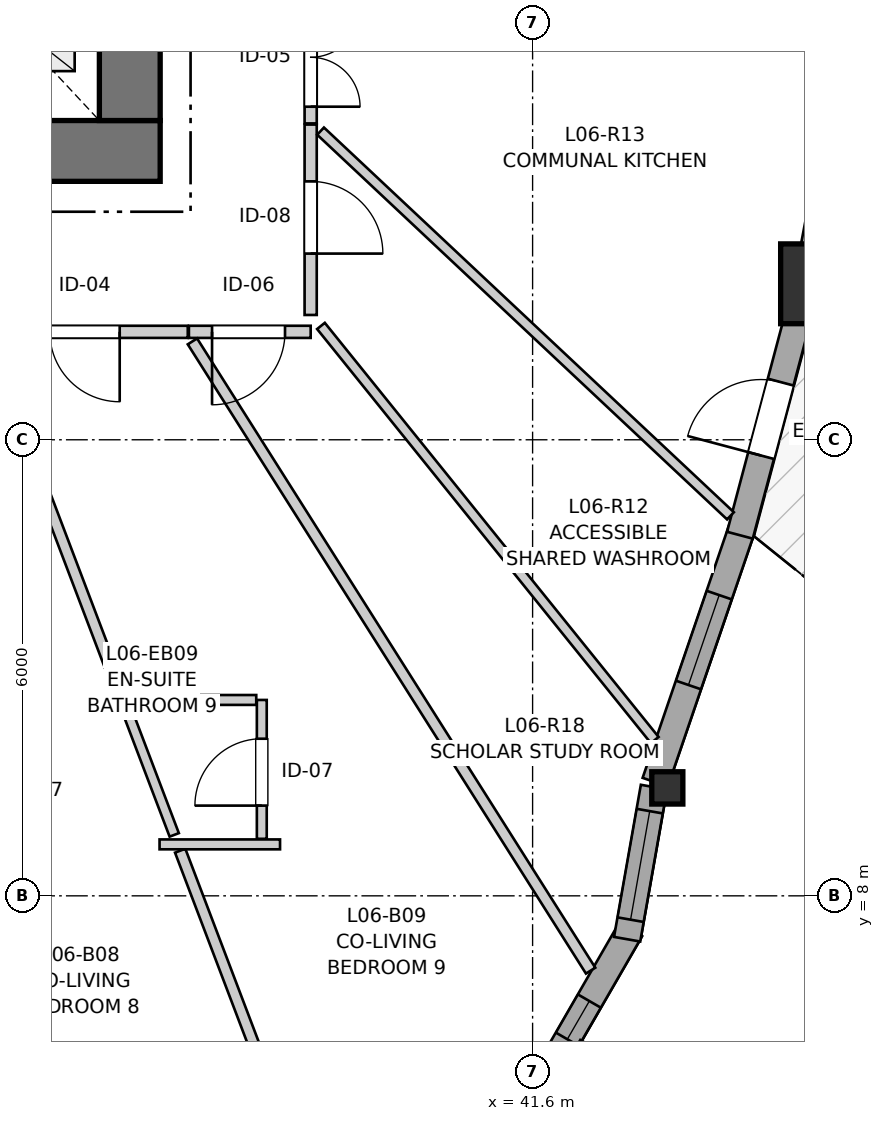
"""IFC4 building model, lengths in metres.
Left out: names, types, materials, properties, quantities, classifications, styles, units other than length and angle.
Written with IfcOpenShell. Run it as: python <this file> out.ifc"""

import sys

from ifc_helpers import new_model, si_unit, direction, frame, frame_2d, origin, origin_2d, place, context, subcontext, project, spatial, rectangle, i_section, extrude, source, transform, mapped, element, fill, save


model = new_model("IFC4")
c1 = context("Model", 3, precision=1e-05, world=origin(), true_north=direction((0.0, 1.0)))
c2 = subcontext(c1, "Body", "Model", "MODEL_VIEW")
j1 = project(units=[si_unit("LENGTHUNIT", "METRE"), si_unit("PLANEANGLEUNIT", "RADIAN")], contexts=[c1])
p1 = place(None, origin())
s1 = spatial("IfcSite", under=j1, at=p1, CompositionType="ELEMENT")
p2 = place(p1, origin())
s2 = spatial("IfcBuilding", under=s1, at=p2, CompositionType="ELEMENT")
p3 = place(p2, frame((0.0, 0.0, 23.8)))
s3 = spatial("IfcBuildingStorey", under=s2, at=p3, CompositionType="ELEMENT", Elevation=23.8)
p4 = place(p3, frame((24.0, 17.8, 0.0), z_axis=(0.0, 0.0, 1.0), x_axis=(1.0, 0.0, 0.0)))
e1 = element("IfcWall", 1, at=p4, inside=s3, PredefinedType="SHEAR", context=c2, shape_type="SweptSolid", body=[
    extrude(rectangle(XDim=12.7, YDim=0.8, at=frame_2d((6.35, 0.0))), origin(), (0.0, 0.0, 1.0), 2.935),
])
p5 = place(p3, frame((36.3, 18.2, 0.0), z_axis=(0.0, 0.0, 1.0), x_axis=(0.0, 1.0, 0.0)))
e2 = element("IfcWall", 2, at=p5, inside=s3, PredefinedType="SHEAR", context=c2, shape_type="SweptSolid", body=[
    extrude(rectangle(XDim=15.6, YDim=0.8, at=frame_2d((7.8, 0.0))), origin(), (0.0, 0.0, 1.0), 2.935),
])
p6 = place(p5, frame((4.25, 0.0, 0.0)))
e3 = element("IfcOpeningElement", 3, at=p6, cuts=e2, PredefinedType="OPENING", context=c2, shape_type="SweptSolid", body=[
    extrude(rectangle(XDim=1.1, YDim=2.15, at=frame_2d((0.55, 1.075))), frame((0.0, 0.41, 0.0), z_axis=(0.0, -1.0, 0.0), x_axis=(1.0, 0.0, 0.0)), (0.0, 0.0, 1.0), 0.82),
])
p7 = place(p5, frame((10.25, 0.0, 0.0)))
e4 = element("IfcOpeningElement", 4, at=p7, cuts=e2, PredefinedType="OPENING", context=c2, shape_type="SweptSolid", body=[
    extrude(rectangle(XDim=1.1, YDim=2.15, at=frame_2d((0.55, 1.075))), frame((0.0, 0.41, 0.0), z_axis=(0.0, -1.0, 0.0), x_axis=(1.0, 0.0, 0.0)), (0.0, 0.0, 1.0), 0.82),
])
m1 = source(origin(), c2, "Body", "SweptSolid", [
    extrude(i_section(OverallWidth=0.409, OverallDepth=0.425, WebThickness=0.03, FlangeThickness=0.048, FilletRadius=0.015, at=origin_2d()), origin(), (0.0, 0.0, 1.0), 2.935),
])
p8 = place(p3, frame((43.373, 9.42, 0.0), z_axis=(0.0, 0.0, 1.0), x_axis=(1.0, 0.0, 0.0)))
e5 = element("IfcColumn", 5, at=p8, inside=s3, PredefinedType="PILASTER", context=c2, shape_type="MappedRepresentation", body=[
    mapped(m1, transform((0.0, 0.0, 0.0), x_axis=(1.0, 0.0, 0.0), y_axis=(0.0, 1.0, 0.0), z_axis=(0.0, 0.0, 1.0), scale=1.0)),
])
m2 = source(origin(), c2, "Body", "SweptSolid", [
    extrude(rectangle(XDim=1.05, YDim=1.05, at=origin_2d()), origin(), (0.0, 0.0, 1.0), 2.935),
])
p9 = place(p3, frame((45.389, 16.052, 0.0), z_axis=(0.0, 0.0, 1.0), x_axis=(1.0, 0.0, 0.0)))
e6 = element("IfcColumn", 6, at=p9, inside=s3, PredefinedType="COLUMN", context=c2, shape_type="MappedRepresentation", body=[
    mapped(m2, transform((0.0, 0.0, 0.0), x_axis=(1.0, 0.0, 0.0), y_axis=(0.0, 1.0, 0.0), z_axis=(0.0, 0.0, 1.0), scale=1.0)),
])
p10 = place(p3, frame((41.845, 5.746, 0.0), z_axis=(0.0, 0.0, 1.0), x_axis=(0.499995423472, 0.866028046028, 0.0)))
e7 = element("IfcWall", 7, at=p10, inside=s3, PredefinedType="SOLIDWALL", context=c2, shape_type="SweptSolid", body=[
    extrude(rectangle(XDim=2.09, YDim=0.35, at=frame_2d((1.045, 0.0))), origin(), (0.0, 0.0, 1.0), 2.415),
])
p11 = place(p10, frame((0.424, 0.0, 0.82)))
e8 = element("IfcOpeningElement", 8, at=p11, cuts=e7, PredefinedType="OPENING", context=c2, shape_type="SweptSolid", body=[
    extrude(rectangle(XDim=0.58, YDim=1.35, at=frame_2d((0.29, 0.675))), frame((0.0, 0.185, 0.0), z_axis=(0.0, -1.0, 0.0), x_axis=(1.0, 0.0, 0.0)), (0.0, 0.0, 1.0), 0.37),
])
p12 = place(p3, frame((42.844, 7.429, 0.0), z_axis=(0.0, 0.0, 1.0), x_axis=(0.17370309897, 0.984798067326, 0.0)))
e9 = element("IfcWall", 9, at=p12, inside=s3, PredefinedType="SOLIDWALL", context=c2, shape_type="SweptSolid", body=[
    extrude(rectangle(XDim=2.032, YDim=0.35, at=frame_2d((1.016, 0.0))), origin(), (0.0, 0.0, 1.0), 2.415),
])
p13 = place(p12, frame((0.261, 0.0, 0.82)))
e10 = element("IfcOpeningElement", 10, at=p13, cuts=e9, PredefinedType="OPENING", context=c2, shape_type="SweptSolid", body=[
    extrude(rectangle(XDim=1.45, YDim=1.25, at=frame_2d((0.725, 0.625))), frame((0.0, 0.185, 0.0), z_axis=(0.0, -1.0, 0.0), x_axis=(1.0, 0.0, 0.0)), (0.0, 0.0, 1.0), 0.37),
])
p14 = place(p3, frame((43.213, 9.496, 0.0), z_axis=(0.0, 0.0, 1.0), x_axis=(0.323599506414, 0.946194144692, 0.0)))
e11 = element("IfcWall", 11, at=p14, inside=s3, PredefinedType="SOLIDWALL", context=c2, shape_type="SweptSolid", body=[
    extrude(rectangle(XDim=3.522, YDim=0.35, at=frame_2d((1.761, 0.0))), origin(), (0.0, 0.0, 1.0), 2.415),
])
p15 = place(p14, frame((1.351, 0.0, 0.82)))
e12 = element("IfcOpeningElement", 12, at=p15, cuts=e11, PredefinedType="OPENING", context=c2, shape_type="SweptSolid", body=[
    extrude(rectangle(XDim=1.25, YDim=1.35, at=frame_2d((0.625, 0.675))), frame((0.0, 0.185, 0.0), z_axis=(0.0, -1.0, 0.0), x_axis=(1.0, 0.0, 0.0)), (0.0, 0.0, 1.0), 0.37),
])
p16 = place(p3, frame((44.328, 12.744, 0.0), z_axis=(0.0, 0.0, 1.0), x_axis=(0.257063268192, 0.966394575806, 0.0)))
e13 = element("IfcWall", 13, at=p16, inside=s3, PredefinedType="SOLIDWALL", context=c2, shape_type="SweptSolid", body=[
    extrude(rectangle(XDim=3.169, YDim=0.35, at=frame_2d((1.584, 0.0))), origin(), (0.0, 0.0, 1.0), 2.415),
])
p17 = place(p16, frame((1.085, 0.0, 0.0)))
e14 = element("IfcOpeningElement", 14, at=p17, cuts=e13, PredefinedType="OPENING", context=c2, shape_type="SweptSolid", body=[
    extrude(rectangle(XDim=1.0, YDim=2.1, at=frame_2d((0.5, 1.05))), frame((0.0, 0.185, 0.0), z_axis=(0.0, -1.0, 0.0), x_axis=(1.0, 0.0, 0.0)), (0.0, 0.0, 1.0), 0.37),
])
p18 = place(p3, frame((45.273, 16.379, 0.0), z_axis=(0.0, 0.0, 1.0), x_axis=(0.186712111557, 0.982414671815, 0.0)))
e15 = element("IfcWall", 15, at=p18, inside=s3, PredefinedType="SOLIDWALL", context=c2, shape_type="SweptSolid", body=[
    extrude(rectangle(XDim=3.113, YDim=0.35, at=frame_2d((1.557, 0.0))), origin(), (0.0, 0.0, 1.0), 2.415),
])
p19 = place(p18, frame((0.939, 0.0, 0.82)))
e16 = element("IfcOpeningElement", 16, at=p19, cuts=e15, PredefinedType="OPENING", context=c2, shape_type="SweptSolid", body=[
    extrude(rectangle(XDim=0.95, YDim=1.35, at=frame_2d((0.475, 0.675))), frame((0.0, 0.185, 0.0), z_axis=(0.0, -1.0, 0.0), x_axis=(1.0, 0.0, 0.0)), (0.0, 0.0, 1.0), 0.37),
])
p20 = place(p3, frame((38.68, 22.264, 0.0), z_axis=(0.0, 0.0, 1.0), x_axis=(0.0, -1.0, 0.0)))
e17 = element("IfcWall", 17, at=p20, inside=s3, PredefinedType="PARTITIONING", context=c2, shape_type="SweptSolid", body=[
    extrude(rectangle(XDim=4.102, YDim=0.16, at=frame_2d((2.051, 0.0))), origin(), (0.0, 0.0, 1.0), 2.935),
])
p21 = place(p20, frame((2.582, 0.0, 0.0)))
e18 = element("IfcOpeningElement", 18, at=p21, cuts=e17, PredefinedType="OPENING", context=c2, shape_type="SweptSolid", body=[
    extrude(rectangle(XDim=1.3, YDim=2.1, at=frame_2d((0.65, 1.05))), frame((0.0, 0.09, 0.0), z_axis=(0.0, -1.0, 0.0), x_axis=(1.0, 0.0, 0.0)), (0.0, 0.0, 1.0), 0.18),
])
p22 = place(p3, frame((37.063, 15.42, 0.0), z_axis=(0.0, 0.0, 1.0), x_axis=(-1.0, 0.0, 0.0)))
e19 = element("IfcWall", 19, at=p22, inside=s3, PredefinedType="PARTITIONING", context=c2, shape_type="SweptSolid", body=[
    extrude(rectangle(XDim=2.709, YDim=0.16, at=frame_2d((1.354, 0.0))), origin(), (0.0, 0.0, 1.0), 2.935),
])
p23 = place(p22, frame((0.896, 0.0, 0.0)))
e20 = element("IfcOpeningElement", 20, at=p23, cuts=e19, PredefinedType="OPENING", context=c2, shape_type="SweptSolid", body=[
    extrude(rectangle(XDim=0.92, YDim=2.1, at=frame_2d((0.46, 1.05))), frame((0.0, 0.09, 0.0), z_axis=(0.0, -1.0, 0.0), x_axis=(1.0, 0.0, 0.0)), (0.0, 0.0, 1.0), 0.18),
])
p24 = place(p3, frame((38.68, 18.147, 0.0), z_axis=(0.0, 0.0, 1.0), x_axis=(0.0, -1.0, 0.0)))
e21 = element("IfcWall", 21, at=p24, inside=s3, PredefinedType="PARTITIONING", context=c2, shape_type="SweptSolid", body=[
    extrude(rectangle(XDim=2.505, YDim=0.16, at=frame_2d((1.252, 0.0))), origin(), (0.0, 0.0, 1.0), 2.935),
])
p25 = place(p24, frame((0.748, 0.0, 0.0)))
e22 = element("IfcOpeningElement", 22, at=p25, cuts=e21, PredefinedType="OPENING", context=c2, shape_type="SweptSolid", body=[
    extrude(rectangle(XDim=0.95, YDim=2.1, at=frame_2d((0.475, 1.05))), frame((0.0, 0.09, 0.0), z_axis=(0.0, -1.0, 0.0), x_axis=(1.0, 0.0, 0.0)), (0.0, 0.0, 1.0), 0.18),
])
p26 = place(p3, frame((38.037, 8.75, 0.0), z_axis=(0.0, 0.0, 1.0), x_axis=(0.0, 1.0, 0.0)))
e23 = element("IfcWall", 23, at=p26, inside=s3, PredefinedType="PARTITIONING", context=c2, shape_type="SweptSolid", body=[
    extrude(rectangle(XDim=1.827, YDim=0.13, at=frame_2d((0.914, 0.0))), origin(), (0.0, 0.0, 1.0), 2.935),
])
p27 = place(p26, frame((0.437, 0.0, 0.0)))
e24 = element("IfcOpeningElement", 24, at=p27, cuts=e23, PredefinedType="OPENING", context=c2, shape_type="SweptSolid", body=[
    extrude(rectangle(XDim=0.88, YDim=2.05, at=frame_2d((0.44, 1.025))), frame((0.0, 0.075, 0.0), z_axis=(0.0, -1.0, 0.0), x_axis=(1.0, 0.0, 0.0)), (0.0, 0.0, 1.0), 0.15),
])
p28 = place(p3, frame((38.68, 15.42, 0.0), z_axis=(0.0, 0.0, 1.0), x_axis=(-1.0, 0.0, 0.0)))
e25 = element("IfcWall", 25, at=p28, inside=s3, PredefinedType="PARTITIONING", context=c2, shape_type="SweptSolid", body=[
    extrude(rectangle(XDim=1.602, YDim=0.16, at=frame_2d((0.801, 0.0))), origin(), (0.0, 0.0, 1.0), 2.935),
])
p29 = place(p28, frame((0.337, 0.0, 0.0)))
e26 = element("IfcOpeningElement", 26, at=p29, cuts=e25, PredefinedType="OPENING", context=c2, shape_type="SweptSolid", body=[
    extrude(rectangle(XDim=0.96, YDim=2.1, at=frame_2d((0.48, 1.05))), frame((0.0, 0.09, 0.0), z_axis=(0.0, -1.0, 0.0), x_axis=(1.0, 0.0, 0.0)), (0.0, 0.0, 1.0), 0.18),
])
p30 = place(p3, frame((37.125, 15.294, 0.0), z_axis=(0.0, 0.0, 1.0), x_axis=(0.534743765269, -0.845014263492, 0.0)))
e27 = element("IfcWall", 27, at=p30, inside=s3, PredefinedType="PARTITIONING", context=c2, shape_type="SweptSolid", body=[
    extrude(rectangle(XDim=9.797, YDim=0.145, at=frame_2d((4.899, 0.0))), origin(), (0.0, 0.0, 1.0), 2.935),
])
p31 = place(p3, frame((38.81, 18.061, 0.0), z_axis=(0.0, 0.0, 1.0), x_axis=(0.729196389153, -0.684304483433, 0.0)))
e28 = element("IfcWall", 28, at=p31, inside=s3, PredefinedType="PARTITIONING", context=c2, shape_type="SweptSolid", body=[
    extrude(rectangle(XDim=7.396, YDim=0.13, at=frame_2d((3.698, 0.0))), origin(), (0.0, 0.0, 1.0), 2.935),
])
p32 = place(p3, frame((38.816, 15.498, 0.0), z_axis=(0.0, 0.0, 1.0), x_axis=(0.627528755525, -0.778593386171, 0.0)))
e29 = element("IfcWall", 29, at=p32, inside=s3, PredefinedType="PARTITIONING", context=c2, shape_type="SweptSolid", body=[
    extrude(rectangle(XDim=6.998, YDim=0.13, at=frame_2d((3.499, 0.0))), origin(), (0.0, 0.0, 1.0), 2.935),
])
p33 = place(p3, frame((34.413, 15.307, 0.0), z_axis=(0.0, 0.0, 1.0), x_axis=(0.355171610573, -0.934801116304, 0.0)))
e30 = element("IfcWall", 30, at=p33, inside=s3, PredefinedType="PARTITIONING", context=c2, shape_type="SweptSolid", body=[
    extrude(rectangle(XDim=5.177, YDim=0.145, at=frame_2d((2.589, 0.0))), origin(), (0.0, 0.0, 1.0), 2.935),
])
p34 = place(p3, frame((36.963, 8.594, 0.0), z_axis=(0.0, 0.0, 1.0), x_axis=(0.35524629266, -0.934772737916, 0.0)))
e31 = element("IfcWall", 31, at=p34, inside=s3, PredefinedType="PARTITIONING", context=c2, shape_type="SweptSolid", body=[
    extrude(rectangle(XDim=4.785, YDim=0.145, at=frame_2d((2.393, 0.0))), origin(), (0.0, 0.0, 1.0), 2.935),
])
p35 = place(p3, frame((41.448, 21.001, 0.0), z_axis=(0.0, 0.0, 1.0), x_axis=(0.911733501253, -0.410782208346, 0.0)))
e32 = element("IfcWall", 32, at=p35, inside=s3, PredefinedType="PARTITIONING", context=c2, shape_type="SweptSolid", body=[
    extrude(rectangle(XDim=4.546, YDim=0.145, at=frame_2d((2.273, 0.0))), origin(), (0.0, 0.0, 1.0), 2.103),
])
p36 = place(p3, frame((36.257, 10.453, 0.0), z_axis=(0.0, 0.0, 1.0), x_axis=(0.355345777079, -0.934734924303, 0.0)))
e33 = element("IfcWall", 33, at=p36, inside=s3, PredefinedType="PARTITIONING", context=c2, shape_type="SweptSolid", body=[
    extrude(rectangle(XDim=1.766, YDim=0.13, at=frame_2d((0.883, 0.0))), origin(), (0.0, 0.0, 1.0), 2.935),
])
p37 = place(p3, frame((36.347, 10.577, 0.0), z_axis=(0.0, 0.0, 1.0), x_axis=(1.0, 0.0, 0.0)))
e34 = element("IfcWall", 34, at=p37, inside=s3, PredefinedType="PARTITIONING", context=c2, shape_type="SweptSolid", body=[
    extrude(rectangle(XDim=1.617, YDim=0.13, at=frame_2d((0.808, 0.0))), origin(), (0.0, 0.0, 1.0), 2.935),
])
p38 = place(p3, frame((36.692, 8.677, 0.0), z_axis=(0.0, 0.0, 1.0), x_axis=(1.0, 0.0, 0.0)))
e35 = element("IfcWall", 35, at=p38, inside=s3, PredefinedType="PARTITIONING", context=c2, shape_type="SweptSolid", body=[
    extrude(rectangle(XDim=1.585, YDim=0.13, at=frame_2d((0.792, 0.0))), origin(), (0.0, 0.0, 1.0), 2.935),
])
m3 = source(origin(), c2, "Body", "SweptSolid", [
    extrude(rectangle(XDim=0.58, YDim=1.35, at=frame_2d((0.29, 0.675))), frame((0.0, 0.03, 0.0), z_axis=(0.0, -1.0, 0.0), x_axis=(1.0, 0.0, 0.0)), (0.0, 0.0, 1.0), 0.06),
])
p39 = place(p11, origin())
e36 = element("IfcWindow", 36, at=p39, inside=s3, PartitioningType="SINGLE_PANEL", PredefinedType="WINDOW", context=c2, shape_type="MappedRepresentation", body=[
    mapped(m3, transform((0.0, 0.0, 0.0), x_axis=(1.0, 0.0, 0.0), y_axis=(0.0, 1.0, 0.0), z_axis=(0.0, 0.0, 1.0), scale=1.0)),
])
fill(e8, e36)
m4 = source(origin(), c2, "Body", "SweptSolid", [
    extrude(rectangle(XDim=1.45, YDim=1.25, at=frame_2d((0.725, 0.625))), frame((0.0, 0.03, 0.0), z_axis=(0.0, -1.0, 0.0), x_axis=(1.0, 0.0, 0.0)), (0.0, 0.0, 1.0), 0.06),
])
p40 = place(p13, origin())
e37 = element("IfcWindow", 37, at=p40, inside=s3, PartitioningType="SINGLE_PANEL", PredefinedType="WINDOW", context=c2, shape_type="MappedRepresentation", body=[
    mapped(m4, transform((0.0, 0.0, 0.0), x_axis=(1.0, 0.0, 0.0), y_axis=(0.0, 1.0, 0.0), z_axis=(0.0, 0.0, 1.0), scale=1.0)),
])
fill(e10, e37)
m5 = source(origin(), c2, "Body", "SweptSolid", [
    extrude(rectangle(XDim=1.25, YDim=1.35, at=frame_2d((0.625, 0.675))), frame((0.0, 0.03, 0.0), z_axis=(0.0, -1.0, 0.0), x_axis=(1.0, 0.0, 0.0)), (0.0, 0.0, 1.0), 0.06),
])
p41 = place(p15, origin())
e38 = element("IfcWindow", 38, at=p41, inside=s3, PartitioningType="SINGLE_PANEL", PredefinedType="WINDOW", context=c2, shape_type="MappedRepresentation", body=[
    mapped(m5, transform((0.0, 0.0, 0.0), x_axis=(1.0, 0.0, 0.0), y_axis=(0.0, 1.0, 0.0), z_axis=(0.0, 0.0, 1.0), scale=1.0)),
])
fill(e12, e38)
m6 = source(origin(), c2, "Body", "SweptSolid", [
    extrude(rectangle(XDim=1.0, YDim=2.1, at=frame_2d((0.5, 1.05))), frame((0.0, 0.025, 0.0), z_axis=(0.0, -1.0, 0.0), x_axis=(1.0, 0.0, 0.0)), (0.0, 0.0, 1.0), 0.05),
])
p42 = place(p17, origin())
e39 = element("IfcDoor", 39, at=p42, inside=s3, OperationType="SINGLE_SWING_LEFT", PredefinedType="DOOR", context=c2, shape_type="MappedRepresentation", body=[
    mapped(m6, transform((0.0, 0.0, 0.0), x_axis=(1.0, 0.0, 0.0), y_axis=(0.0, 1.0, 0.0), z_axis=(0.0, 0.0, 1.0), scale=1.0)),
])
fill(e14, e39)
m7 = source(origin(), c2, "Body", "SweptSolid", [
    extrude(rectangle(XDim=1.3, YDim=2.1, at=frame_2d((0.65, 1.05))), frame((0.0, 0.025, 0.0), z_axis=(0.0, -1.0, 0.0), x_axis=(1.0, 0.0, 0.0)), (0.0, 0.0, 1.0), 0.05),
])
p43 = place(p21, origin())
e40 = element("IfcDoor", 40, at=p43, inside=s3, OperationType="DOUBLE_DOOR_SINGLE_SWING", PredefinedType="DOOR", context=c2, shape_type="MappedRepresentation", body=[
    mapped(m7, transform((0.0, 0.0, 0.0), x_axis=(1.0, 0.0, 0.0), y_axis=(0.0, 1.0, 0.0), z_axis=(0.0, 0.0, 1.0), scale=1.0)),
])
fill(e18, e40)
m8 = source(origin(), c2, "Body", "SweptSolid", [
    extrude(rectangle(XDim=0.92, YDim=2.1, at=frame_2d((0.46, 1.05))), frame((0.0, 0.025, 0.0), z_axis=(0.0, -1.0, 0.0), x_axis=(1.0, 0.0, 0.0)), (0.0, 0.0, 1.0), 0.05),
])
p44 = place(p23, origin())
e41 = element("IfcDoor", 41, at=p44, inside=s3, OperationType="SINGLE_SWING_LEFT", PredefinedType="DOOR", context=c2, shape_type="MappedRepresentation", body=[
    mapped(m8, transform((0.0, 0.0, 0.0), x_axis=(1.0, 0.0, 0.0), y_axis=(0.0, 1.0, 0.0), z_axis=(0.0, 0.0, 1.0), scale=1.0)),
])
fill(e20, e41)
m9 = source(origin(), c2, "Body", "SweptSolid", [
    extrude(rectangle(XDim=0.95, YDim=2.1, at=frame_2d((0.475, 1.05))), frame((0.0, 0.025, 0.0), z_axis=(0.0, -1.0, 0.0), x_axis=(1.0, 0.0, 0.0)), (0.0, 0.0, 1.0), 0.05),
])
p45 = place(p25, origin())
e42 = element("IfcDoor", 42, at=p45, inside=s3, OperationType="SINGLE_SWING_RIGHT", PredefinedType="DOOR", context=c2, shape_type="MappedRepresentation", body=[
    mapped(m9, transform((0.0, 0.0, 0.0), x_axis=(1.0, 0.0, 0.0), y_axis=(0.0, 1.0, 0.0), z_axis=(0.0, 0.0, 1.0), scale=1.0)),
])
fill(e22, e42)
m10 = source(origin(), c2, "Body", "SweptSolid", [
    extrude(rectangle(XDim=0.88, YDim=2.05, at=frame_2d((0.44, 1.025))), frame((0.0, 0.025, 0.0), z_axis=(0.0, -1.0, 0.0), x_axis=(1.0, 0.0, 0.0)), (0.0, 0.0, 1.0), 0.05),
])
p46 = place(p27, origin())
e43 = element("IfcDoor", 43, at=p46, inside=s3, OperationType="SINGLE_SWING_LEFT", PredefinedType="DOOR", context=c2, shape_type="MappedRepresentation", body=[
    mapped(m10, transform((0.0, 0.0, 0.0), x_axis=(1.0, 0.0, 0.0), y_axis=(0.0, 1.0, 0.0), z_axis=(0.0, 0.0, 1.0), scale=1.0)),
])
fill(e24, e43)
m11 = source(origin(), c2, "Body", "SweptSolid", [
    extrude(rectangle(XDim=0.96, YDim=2.1, at=frame_2d((0.48, 1.05))), frame((0.0, 0.025, 0.0), z_axis=(0.0, -1.0, 0.0), x_axis=(1.0, 0.0, 0.0)), (0.0, 0.0, 1.0), 0.05),
])
p47 = place(p29, origin())
e44 = element("IfcDoor", 44, at=p47, inside=s3, OperationType="SINGLE_SWING_RIGHT", PredefinedType="DOOR", context=c2, shape_type="MappedRepresentation", body=[
    mapped(m11, transform((0.0, 0.0, 0.0), x_axis=(1.0, 0.0, 0.0), y_axis=(0.0, 1.0, 0.0), z_axis=(0.0, 0.0, 1.0), scale=1.0)),
])
fill(e26, e44)
save(model, sys.argv[1])
